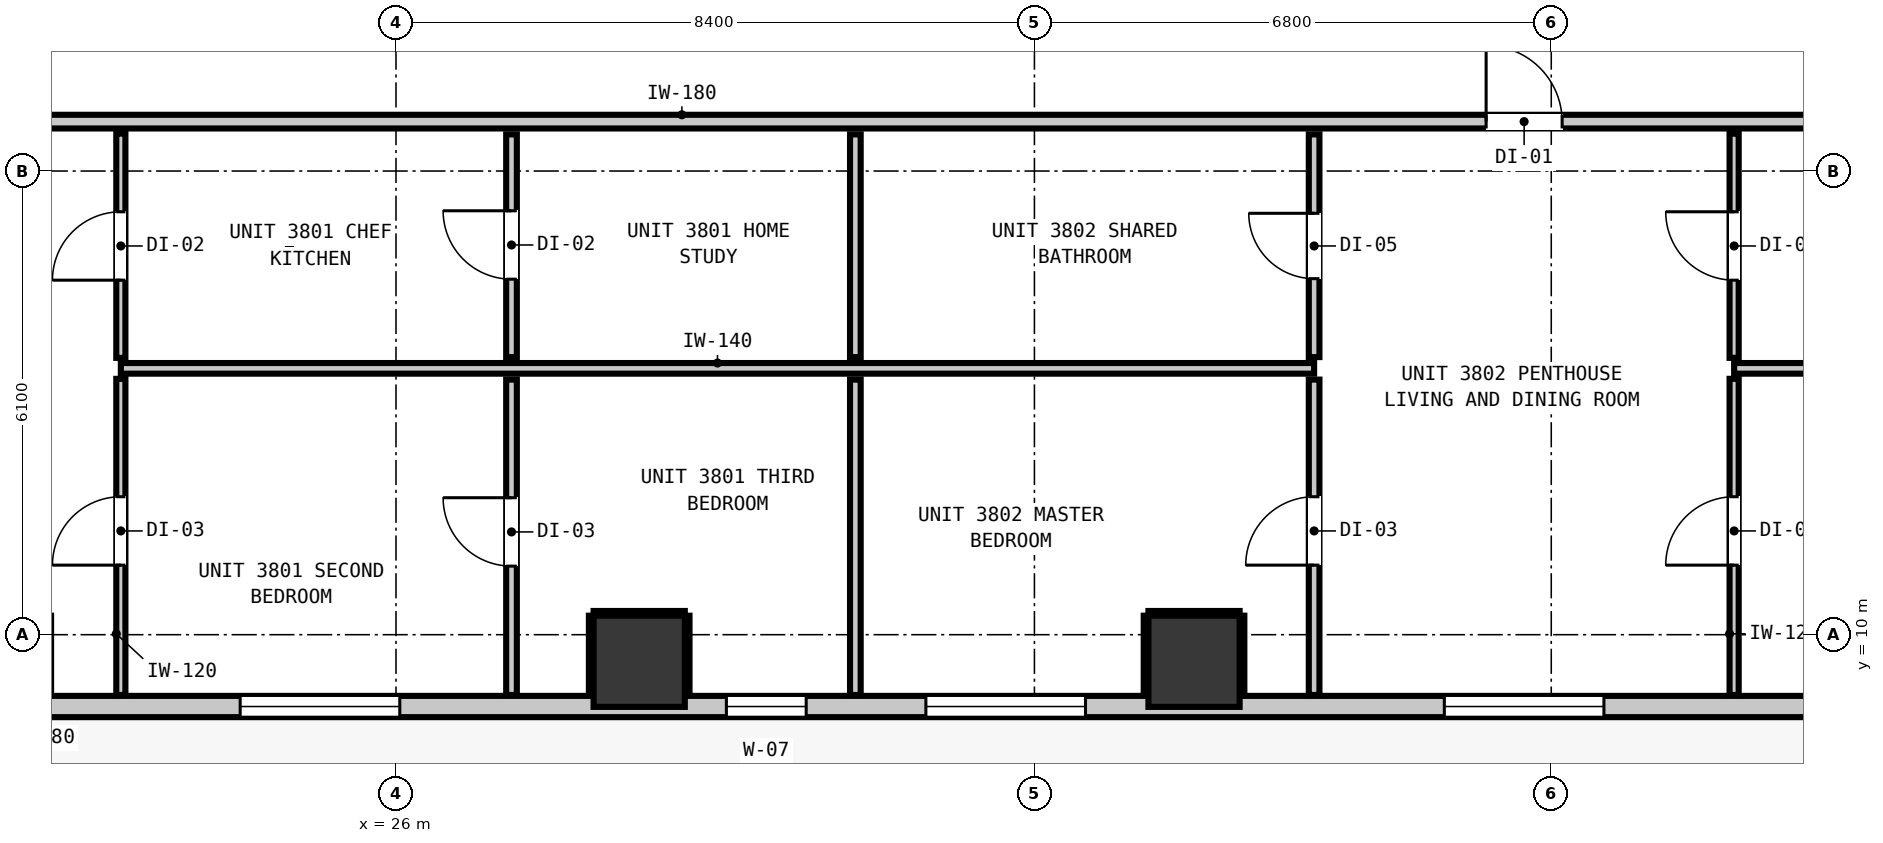
"""IFC4 building model, lengths in metres.
Left out: names, types, materials, properties, quantities, classifications, styles, units other than length and angle.
Written with IfcOpenShell. Run it as: python <this file> out.ifc"""

import sys

from ifc_helpers import new_model, si_unit, direction, frame, frame_2d, origin, origin_2d, place, context, subcontext, project, spatial, rectangle, extrude, element, fill, save


model = new_model("IFC4")
c1 = context("Model", 3, precision=1e-05, world=origin(), true_north=direction((0.0, 1.0)))
c2 = subcontext(c1, "Body", "Model", "MODEL_VIEW")
j1 = project(units=[si_unit("LENGTHUNIT", "METRE"), si_unit("PLANEANGLEUNIT", "RADIAN")], contexts=[c1])
p1 = place(None, origin())
s1 = spatial("IfcSite", under=j1, at=p1, CompositionType="ELEMENT")
p2 = place(p1, origin())
s2 = spatial("IfcBuilding", under=s1, at=p2, CompositionType="ELEMENT")
p3 = place(p2, frame((0.0, 0.0, 132.64)))
s3 = spatial("IfcBuildingStorey", under=s2, at=p3, CompositionType="ELEMENT", Elevation=132.64)
for number, where, z_axis, x_axis in (
    (1, (29.2, 9.65, 0.0), (0.0, 0.0, 1.0), (1.0, 0.0, 0.0)),
    (2, (36.5, 9.65, 0.0), (0.0, 0.0, 1.0), (1.0, 0.0, 0.0)),
):
    element("IfcColumn", number, at=place(p3, frame(where, z_axis=z_axis, x_axis=x_axis)), inside=s3, PredefinedType="COLUMN", context=c2, shape_type="SweptSolid", body=[
        extrude(rectangle(XDim=1.2, YDim=1.2, at=origin_2d()), origin(), (0.0, 0.0, 1.0), 3.32),
    ])
p4 = place(p3, frame((46.645, 9.055, 0.0), z_axis=(0.0, 0.0, 1.0), x_axis=(-1.0, 0.0, 0.0)))
e3 = element("IfcWall", 3, at=p4, inside=s3, PredefinedType="STANDARD", context=c2, shape_type="SweptSolid", body=[
    extrude(rectangle(XDim=35.09, YDim=0.28, at=frame_2d((17.545, 0.0))), origin(), (0.0, 0.0, 1.0), 3.08),
])
p5 = place(p4, frame((0.904, 0.0, 0.0)))
e4 = element("IfcOpeningElement", 4, at=p5, cuts=e3, PredefinedType="OPENING", context=c2, shape_type="SweptSolid", body=[
    extrude(rectangle(XDim=1.0, YDim=2.15, at=frame_2d((0.5, 1.075))), frame((0.0, 0.15, 0.0), z_axis=(0.0, -1.0, 0.0), x_axis=(1.0, 0.0, 0.0)), (0.0, 0.0, 1.0), 0.3),
])
p6 = place(p4, frame((27.955, 0.0, 0.85)))
e5 = element("IfcOpeningElement", 5, at=p6, cuts=e3, PredefinedType="OPENING", context=c2, shape_type="SweptSolid", body=[
    extrude(rectangle(XDim=2.1, YDim=1.9, at=frame_2d((1.05, 0.95))), frame((0.0, 0.15, 0.0), z_axis=(0.0, -1.0, 0.0), x_axis=(1.0, 0.0, 0.0)), (0.0, 0.0, 1.0), 0.3),
])
p7 = place(p4, frame((34.133, 0.0, 0.85)))
e6 = element("IfcOpeningElement", 6, at=p7, cuts=e3, PredefinedType="OPENING", context=c2, shape_type="SweptSolid", body=[
    extrude(rectangle(XDim=0.58, YDim=1.5, at=frame_2d((0.29, 0.75))), frame((0.0, 0.15, 0.0), z_axis=(0.0, -1.0, 0.0), x_axis=(1.0, 0.0, 0.0)), (0.0, 0.0, 1.0), 0.3),
])
p8 = place(p4, frame((20.595, 0.0, 0.85)))
e7 = element("IfcOpeningElement", 7, at=p8, cuts=e3, PredefinedType="OPENING", context=c2, shape_type="SweptSolid", body=[
    extrude(rectangle(XDim=2.1, YDim=1.9, at=frame_2d((1.05, 0.95))), frame((0.0, 0.15, 0.0), z_axis=(0.0, -1.0, 0.0), x_axis=(1.0, 0.0, 0.0)), (0.0, 0.0, 1.0), 0.3),
])
p9 = place(p4, frame((15.248, 0.0, 0.85)))
e8 = element("IfcOpeningElement", 8, at=p9, cuts=e3, PredefinedType="OPENING", context=c2, shape_type="SweptSolid", body=[
    extrude(rectangle(XDim=1.05, YDim=1.65, at=frame_2d((0.525, 0.825))), frame((0.0, 0.15, 0.0), z_axis=(0.0, -1.0, 0.0), x_axis=(1.0, 0.0, 0.0)), (0.0, 0.0, 1.0), 0.3),
])
p10 = place(p4, frame((4.752, 0.0, 0.85)))
e9 = element("IfcOpeningElement", 9, at=p10, cuts=e3, PredefinedType="OPENING", context=c2, shape_type="SweptSolid", body=[
    extrude(rectangle(XDim=2.1, YDim=1.9, at=frame_2d((1.05, 0.95))), frame((0.0, 0.15, 0.0), z_axis=(0.0, -1.0, 0.0), x_axis=(1.0, 0.0, 0.0)), (0.0, 0.0, 1.0), 0.3),
])
p11 = place(p4, frame((11.573, 0.0, 0.85)))
e10 = element("IfcOpeningElement", 10, at=p11, cuts=e3, PredefinedType="OPENING", context=c2, shape_type="SweptSolid", body=[
    extrude(rectangle(XDim=2.1, YDim=1.9, at=frame_2d((1.05, 0.95))), frame((0.0, 0.15, 0.0), z_axis=(0.0, -1.0, 0.0), x_axis=(1.0, 0.0, 0.0)), (0.0, 0.0, 1.0), 0.3),
])
p12 = place(p3, frame((9.407, 16.75, 0.0), z_axis=(0.0, 0.0, 1.0), x_axis=(1.0, 0.0, 0.0)))
e11 = element("IfcWall", 11, at=p12, inside=s3, PredefinedType="PARTITIONING", context=c2, shape_type="SweptSolid", body=[
    extrude(rectangle(XDim=39.386, YDim=0.18, at=frame_2d((19.693, 0.0))), origin(), (0.0, 0.0, 1.0), 3.08),
])
p13 = place(p12, frame((8.773, 0.0, 0.0)))
e12 = element("IfcOpeningElement", 12, at=p13, cuts=e11, PredefinedType="OPENING", context=c2, shape_type="SweptSolid", body=[
    extrude(rectangle(XDim=1.0, YDim=2.15, at=frame_2d((0.5, 1.075))), frame((0.0, 0.1, 0.0), z_axis=(0.0, -1.0, 0.0), x_axis=(1.0, 0.0, 0.0)), (0.0, 0.0, 1.0), 0.2),
])
p14 = place(p12, frame((30.936, 0.0, 0.0)))
e13 = element("IfcOpeningElement", 13, at=p14, cuts=e11, PredefinedType="OPENING", context=c2, shape_type="SweptSolid", body=[
    extrude(rectangle(XDim=1.0, YDim=2.15, at=frame_2d((0.5, 1.075))), frame((0.0, 0.1, 0.0), z_axis=(0.0, -1.0, 0.0), x_axis=(1.0, 0.0, 0.0)), (0.0, 0.0, 1.0), 0.2),
])
p15 = place(p3, frame((22.38, 13.504, 0.0), z_axis=(0.0, 0.0, 1.0), x_axis=(1.0, 0.0, 0.0)))
e14 = element("IfcWall", 14, at=p15, inside=s3, PredefinedType="PARTITIONING", context=c2, shape_type="SweptSolid", body=[
    extrude(rectangle(XDim=15.7, YDim=0.14, at=frame_2d((7.85, 0.0))), origin(), (0.0, 0.0, 1.0), 3.08),
])
p16 = place(p3, frame((43.606, 13.504, 0.0), z_axis=(0.0, 0.0, 1.0), x_axis=(1.0, 0.0, 0.0)))
e15 = element("IfcWall", 15, at=p16, inside=s3, PredefinedType="PARTITIONING", context=c2, shape_type="SweptSolid", body=[
    extrude(rectangle(XDim=5.187, YDim=0.14, at=frame_2d((2.594, 0.0))), origin(), (0.0, 0.0, 1.0), 3.08),
])
p17 = place(p3, frame((27.52, 9.207, 0.0), z_axis=(0.0, 0.0, 1.0), x_axis=(0.0, 1.0, 0.0)))
e16 = element("IfcWall", 16, at=p17, inside=s3, PredefinedType="PARTITIONING", context=c2, shape_type="SweptSolid", body=[
    extrude(rectangle(XDim=4.149, YDim=0.14, at=frame_2d((2.074, 0.0))), origin(), (0.0, 0.0, 1.0), 3.08),
])
p18 = place(p17, frame((1.695, 0.0, 0.0)))
e17 = element("IfcOpeningElement", 17, at=p18, cuts=e16, PredefinedType="OPENING", context=c2, shape_type="SweptSolid", body=[
    extrude(rectangle(XDim=0.9, YDim=2.1, at=frame_2d((0.45, 1.05))), frame((0.0, 0.08, 0.0), z_axis=(0.0, -1.0, 0.0), x_axis=(1.0, 0.0, 0.0)), (0.0, 0.0, 1.0), 0.16),
])
p19 = place(p3, frame((27.52, 13.652, 0.0), z_axis=(0.0, 0.0, 1.0), x_axis=(0.0, 1.0, 0.0)))
e18 = element("IfcWall", 18, at=p19, inside=s3, PredefinedType="PARTITIONING", context=c2, shape_type="SweptSolid", body=[
    extrude(rectangle(XDim=2.93, YDim=0.14, at=frame_2d((1.465, 0.0))), origin(), (0.0, 0.0, 1.0), 3.08),
])
p20 = place(p19, frame((1.025, 0.0, 0.0)))
e19 = element("IfcOpeningElement", 19, at=p20, cuts=e18, PredefinedType="OPENING", context=c2, shape_type="SweptSolid", body=[
    extrude(rectangle(XDim=0.9, YDim=2.1, at=frame_2d((0.45, 1.05))), frame((0.0, 0.08, 0.0), z_axis=(0.0, -1.0, 0.0), x_axis=(1.0, 0.0, 0.0)), (0.0, 0.0, 1.0), 0.16),
])
p21 = place(p3, frame((32.044, 9.207, 0.0), z_axis=(0.0, 0.0, 1.0), x_axis=(0.0, 1.0, 0.0)))
e20 = element("IfcWall", 20, at=p21, inside=s3, PredefinedType="PARTITIONING", context=c2, shape_type="SweptSolid", body=[
    extrude(rectangle(XDim=4.149, YDim=0.14, at=frame_2d((2.074, 0.0))), origin(), (0.0, 0.0, 1.0), 3.08),
])
p22 = place(p3, frame((32.044, 13.652, 0.0), z_axis=(0.0, 0.0, 1.0), x_axis=(0.0, 1.0, 0.0)))
e21 = element("IfcWall", 21, at=p22, inside=s3, PredefinedType="PARTITIONING", context=c2, shape_type="SweptSolid", body=[
    extrude(rectangle(XDim=2.93, YDim=0.14, at=frame_2d((1.465, 0.0))), origin(), (0.0, 0.0, 1.0), 3.08),
])
p23 = place(p3, frame((38.08, 9.207, 0.0), z_axis=(0.0, 0.0, 1.0), x_axis=(0.0, 1.0, 0.0)))
e22 = element("IfcWall", 22, at=p23, inside=s3, PredefinedType="PARTITIONING", context=c2, shape_type="SweptSolid", body=[
    extrude(rectangle(XDim=4.149, YDim=0.14, at=frame_2d((2.074, 0.0))), origin(), (0.0, 0.0, 1.0), 3.08),
])
p24 = place(p23, frame((1.708, 0.0, 0.0)))
e23 = element("IfcOpeningElement", 23, at=p24, cuts=e22, PredefinedType="OPENING", context=c2, shape_type="SweptSolid", body=[
    extrude(rectangle(XDim=0.9, YDim=2.1, at=frame_2d((0.45, 1.05))), frame((0.0, 0.08, 0.0), z_axis=(0.0, -1.0, 0.0), x_axis=(1.0, 0.0, 0.0)), (0.0, 0.0, 1.0), 0.16),
])
p25 = place(p3, frame((38.08, 13.652, 0.0), z_axis=(0.0, 0.0, 1.0), x_axis=(0.0, 1.0, 0.0)))
e24 = element("IfcWall", 24, at=p25, inside=s3, PredefinedType="PARTITIONING", context=c2, shape_type="SweptSolid", body=[
    extrude(rectangle(XDim=2.93, YDim=0.14, at=frame_2d((1.465, 0.0))), origin(), (0.0, 0.0, 1.0), 3.08),
])
p26 = place(p25, frame((1.032, 0.0, 0.0)))
e25 = element("IfcOpeningElement", 25, at=p26, cuts=e24, PredefinedType="OPENING", context=c2, shape_type="SweptSolid", body=[
    extrude(rectangle(XDim=0.86, YDim=2.02, at=frame_2d((0.43, 1.01))), frame((0.0, 0.08, 0.0), z_axis=(0.0, -1.0, 0.0), x_axis=(1.0, 0.0, 0.0)), (0.0, 0.0, 1.0), 0.16),
])
p27 = place(p3, frame((22.38, 9.207, 0.0), z_axis=(0.0, 0.0, 1.0), x_axis=(0.0, 1.0, 0.0)))
e26 = element("IfcWall", 26, at=p27, inside=s3, PredefinedType="PARTITIONING", context=c2, shape_type="SweptSolid", body=[
    extrude(rectangle(XDim=4.159, YDim=0.12, at=frame_2d((2.08, 0.0))), origin(), (0.0, 0.0, 1.0), 3.08),
])
p28 = place(p27, frame((1.708, 0.0, 0.0)))
e27 = element("IfcOpeningElement", 27, at=p28, cuts=e26, PredefinedType="OPENING", context=c2, shape_type="SweptSolid", body=[
    extrude(rectangle(XDim=0.9, YDim=2.1, at=frame_2d((0.45, 1.05))), frame((0.0, 0.07, 0.0), z_axis=(0.0, -1.0, 0.0), x_axis=(1.0, 0.0, 0.0)), (0.0, 0.0, 1.0), 0.14),
])
p29 = place(p3, frame((22.38, 13.642, 0.0), z_axis=(0.0, 0.0, 1.0), x_axis=(0.0, 1.0, 0.0)))
e28 = element("IfcWall", 28, at=p29, inside=s3, PredefinedType="PARTITIONING", context=c2, shape_type="SweptSolid", body=[
    extrude(rectangle(XDim=2.95, YDim=0.12, at=frame_2d((1.475, 0.0))), origin(), (0.0, 0.0, 1.0), 3.08),
])
p30 = place(p29, frame((1.022, 0.0, 0.0)))
e29 = element("IfcOpeningElement", 29, at=p30, cuts=e28, PredefinedType="OPENING", context=c2, shape_type="SweptSolid", body=[
    extrude(rectangle(XDim=0.9, YDim=2.1, at=frame_2d((0.45, 1.05))), frame((0.0, 0.07, 0.0), z_axis=(0.0, -1.0, 0.0), x_axis=(1.0, 0.0, 0.0)), (0.0, 0.0, 1.0), 0.14),
])
p31 = place(p3, frame((43.606, 9.207, 0.0), z_axis=(0.0, 0.0, 1.0), x_axis=(0.0, 1.0, 0.0)))
e30 = element("IfcWall", 30, at=p31, inside=s3, PredefinedType="PARTITIONING", context=c2, shape_type="SweptSolid", body=[
    extrude(rectangle(XDim=4.159, YDim=0.12, at=frame_2d((2.08, 0.0))), origin(), (0.0, 0.0, 1.0), 3.08),
])
p32 = place(p31, frame((1.708, 0.0, 0.0)))
e31 = element("IfcOpeningElement", 31, at=p32, cuts=e30, PredefinedType="OPENING", context=c2, shape_type="SweptSolid", body=[
    extrude(rectangle(XDim=0.9, YDim=2.1, at=frame_2d((0.45, 1.05))), frame((0.0, 0.07, 0.0), z_axis=(0.0, -1.0, 0.0), x_axis=(1.0, 0.0, 0.0)), (0.0, 0.0, 1.0), 0.14),
])
p33 = place(p3, frame((43.606, 13.642, 0.0), z_axis=(0.0, 0.0, 1.0), x_axis=(0.0, 1.0, 0.0)))
e32 = element("IfcWall", 32, at=p33, inside=s3, PredefinedType="PARTITIONING", context=c2, shape_type="SweptSolid", body=[
    extrude(rectangle(XDim=2.95, YDim=0.12, at=frame_2d((1.475, 0.0))), origin(), (0.0, 0.0, 1.0), 3.08),
])
p34 = place(p33, frame((1.022, 0.0, 0.0)))
e33 = element("IfcOpeningElement", 33, at=p34, cuts=e32, PredefinedType="OPENING", context=c2, shape_type="SweptSolid", body=[
    extrude(rectangle(XDim=0.9, YDim=2.1, at=frame_2d((0.45, 1.05))), frame((0.0, 0.07, 0.0), z_axis=(0.0, -1.0, 0.0), x_axis=(1.0, 0.0, 0.0)), (0.0, 0.0, 1.0), 0.14),
])
p35 = place(p3, frame((28.6, 10.282, 0.0), z_axis=(0.0, 0.0, 1.0), x_axis=(1.0, 0.0, 0.0)))
e34 = element("IfcWall", 34, at=p35, inside=s3, PredefinedType="PARTITIONING", context=c2, shape_type="SweptSolid", body=[
    extrude(rectangle(XDim=1.2, YDim=0.06, at=frame_2d((0.6, 0.0))), origin(), (0.0, 0.0, 1.0), 1.45),
])
for number, where, z_axis, x_axis in (
    (35, (28.568, 9.21, 0.0), (0.0, 0.0, 1.0), (0.0, 1.0, 0.0)),
    (36, (29.832, 9.21, 0.0), (0.0, 0.0, 1.0), (0.0, 1.0, 0.0)),
):
    element("IfcWall", number, at=place(p3, frame(where, z_axis=z_axis, x_axis=x_axis)), inside=s3, PredefinedType="PARTITIONING", context=c2, shape_type="SweptSolid", body=[
        extrude(rectangle(XDim=1.04, YDim=0.06, at=frame_2d((0.52, 0.0))), origin(), (0.0, 0.0, 1.0), 1.45),
    ])
p36 = place(p3, frame((35.9, 10.282, 0.0), z_axis=(0.0, 0.0, 1.0), x_axis=(1.0, 0.0, 0.0)))
e37 = element("IfcWall", 37, at=p36, inside=s3, PredefinedType="PARTITIONING", context=c2, shape_type="SweptSolid", body=[
    extrude(rectangle(XDim=1.2, YDim=0.06, at=frame_2d((0.6, 0.0))), origin(), (0.0, 0.0, 1.0), 1.45),
])
for number, where, z_axis, x_axis in (
    (38, (35.868, 9.21, 0.0), (0.0, 0.0, 1.0), (0.0, 1.0, 0.0)),
    (39, (37.132, 9.21, 0.0), (0.0, 0.0, 1.0), (0.0, 1.0, 0.0)),
):
    element("IfcWall", number, at=place(p3, frame(where, z_axis=z_axis, x_axis=x_axis)), inside=s3, PredefinedType="PARTITIONING", context=c2, shape_type="SweptSolid", body=[
        extrude(rectangle(XDim=1.04, YDim=0.06, at=frame_2d((0.52, 0.0))), origin(), (0.0, 0.0, 1.0), 1.45),
    ])
p37 = place(p8, origin())
e40 = element("IfcWindow", 40, at=p37, inside=s3, PartitioningType="SINGLE_PANEL", PredefinedType="WINDOW", context=c2, shape_type="SweptSolid", body=[
    extrude(rectangle(XDim=2.1, YDim=1.9, at=frame_2d((1.05, 0.95))), frame((0.0, 0.03, 0.0), z_axis=(0.0, -1.0, 0.0), x_axis=(1.0, 0.0, 0.0)), (0.0, 0.0, 1.0), 0.06),
])
fill(e7, e40)
p38 = place(p9, origin())
e41 = element("IfcWindow", 41, at=p38, inside=s3, PartitioningType="SINGLE_PANEL", PredefinedType="WINDOW", context=c2, shape_type="SweptSolid", body=[
    extrude(rectangle(XDim=1.05, YDim=1.65, at=frame_2d((0.525, 0.825))), frame((0.0, 0.03, 0.0), z_axis=(0.0, -1.0, 0.0), x_axis=(1.0, 0.0, 0.0)), (0.0, 0.0, 1.0), 0.06),
])
fill(e8, e41)
p39 = place(p10, origin())
e42 = element("IfcWindow", 42, at=p39, inside=s3, PartitioningType="SINGLE_PANEL", PredefinedType="WINDOW", context=c2, shape_type="SweptSolid", body=[
    extrude(rectangle(XDim=2.1, YDim=1.9, at=frame_2d((1.05, 0.95))), frame((0.0, 0.03, 0.0), z_axis=(0.0, -1.0, 0.0), x_axis=(1.0, 0.0, 0.0)), (0.0, 0.0, 1.0), 0.06),
])
fill(e9, e42)
p40 = place(p11, origin())
e43 = element("IfcWindow", 43, at=p40, inside=s3, PartitioningType="SINGLE_PANEL", PredefinedType="WINDOW", context=c2, shape_type="SweptSolid", body=[
    extrude(rectangle(XDim=2.1, YDim=1.9, at=frame_2d((1.05, 0.95))), frame((0.0, 0.03, 0.0), z_axis=(0.0, -1.0, 0.0), x_axis=(1.0, 0.0, 0.0)), (0.0, 0.0, 1.0), 0.06),
])
fill(e10, e43)
p41 = place(p30, origin())
e44 = element("IfcDoor", 44, at=p41, inside=s3, OperationType="SINGLE_SWING_LEFT", PredefinedType="DOOR", context=c2, shape_type="SweptSolid", body=[
    extrude(rectangle(XDim=0.9, YDim=2.1, at=frame_2d((0.45, 1.05))), frame((0.0, 0.025, 0.0), z_axis=(0.0, -1.0, 0.0), x_axis=(1.0, 0.0, 0.0)), (0.0, 0.0, 1.0), 0.05),
])
fill(e29, e44)
p42 = place(p20, origin())
e45 = element("IfcDoor", 45, at=p42, inside=s3, OperationType="SINGLE_SWING_RIGHT", PredefinedType="DOOR", context=c2, shape_type="SweptSolid", body=[
    extrude(rectangle(XDim=0.9, YDim=2.1, at=frame_2d((0.45, 1.05))), frame((0.0, 0.025, 0.0), z_axis=(0.0, -1.0, 0.0), x_axis=(1.0, 0.0, 0.0)), (0.0, 0.0, 1.0), 0.05),
])
fill(e19, e45)
p43 = place(p28, origin())
e46 = element("IfcDoor", 46, at=p43, inside=s3, OperationType="SINGLE_SWING_LEFT", PredefinedType="DOOR", context=c2, shape_type="SweptSolid", body=[
    extrude(rectangle(XDim=0.9, YDim=2.1, at=frame_2d((0.45, 1.05))), frame((0.0, 0.025, 0.0), z_axis=(0.0, -1.0, 0.0), x_axis=(1.0, 0.0, 0.0)), (0.0, 0.0, 1.0), 0.05),
])
fill(e27, e46)
p44 = place(p18, origin())
e47 = element("IfcDoor", 47, at=p44, inside=s3, OperationType="SINGLE_SWING_RIGHT", PredefinedType="DOOR", context=c2, shape_type="SweptSolid", body=[
    extrude(rectangle(XDim=0.9, YDim=2.1, at=frame_2d((0.45, 1.05))), frame((0.0, 0.025, 0.0), z_axis=(0.0, -1.0, 0.0), x_axis=(1.0, 0.0, 0.0)), (0.0, 0.0, 1.0), 0.05),
])
fill(e17, e47)
p45 = place(p14, origin())
e48 = element("IfcDoor", 48, at=p45, inside=s3, OperationType="SINGLE_SWING_LEFT", PredefinedType="DOOR", context=c2, shape_type="SweptSolid", body=[
    extrude(rectangle(XDim=1.0, YDim=2.15, at=frame_2d((0.5, 1.075))), frame((0.0, 0.025, 0.0), z_axis=(0.0, -1.0, 0.0), x_axis=(1.0, 0.0, 0.0)), (0.0, 0.0, 1.0), 0.05),
])
fill(e13, e48)
p46 = place(p26, origin())
e49 = element("IfcDoor", 49, at=p46, inside=s3, OperationType="SINGLE_SWING_RIGHT", PredefinedType="DOOR", context=c2, shape_type="SweptSolid", body=[
    extrude(rectangle(XDim=0.86, YDim=2.02, at=frame_2d((0.43, 1.01))), frame((0.0, 0.025, 0.0), z_axis=(0.0, -1.0, 0.0), x_axis=(1.0, 0.0, 0.0)), (0.0, 0.0, 1.0), 0.05),
])
fill(e25, e49)
p47 = place(p24, origin())
e50 = element("IfcDoor", 50, at=p47, inside=s3, OperationType="SINGLE_SWING_LEFT", PredefinedType="DOOR", context=c2, shape_type="SweptSolid", body=[
    extrude(rectangle(XDim=0.9, YDim=2.1, at=frame_2d((0.45, 1.05))), frame((0.0, 0.025, 0.0), z_axis=(0.0, -1.0, 0.0), x_axis=(1.0, 0.0, 0.0)), (0.0, 0.0, 1.0), 0.05),
])
fill(e23, e50)
p48 = place(p34, origin())
e51 = element("IfcDoor", 51, at=p48, inside=s3, OperationType="SINGLE_SWING_RIGHT", PredefinedType="DOOR", context=c2, shape_type="SweptSolid", body=[
    extrude(rectangle(XDim=0.9, YDim=2.1, at=frame_2d((0.45, 1.05))), frame((0.0, 0.025, 0.0), z_axis=(0.0, -1.0, 0.0), x_axis=(1.0, 0.0, 0.0)), (0.0, 0.0, 1.0), 0.05),
])
fill(e33, e51)
p49 = place(p32, origin())
e52 = element("IfcDoor", 52, at=p49, inside=s3, OperationType="SINGLE_SWING_LEFT", PredefinedType="DOOR", context=c2, shape_type="SweptSolid", body=[
    extrude(rectangle(XDim=0.9, YDim=2.1, at=frame_2d((0.45, 1.05))), frame((0.0, 0.025, 0.0), z_axis=(0.0, -1.0, 0.0), x_axis=(1.0, 0.0, 0.0)), (0.0, 0.0, 1.0), 0.05),
])
fill(e31, e52)
save(model, sys.argv[1])
